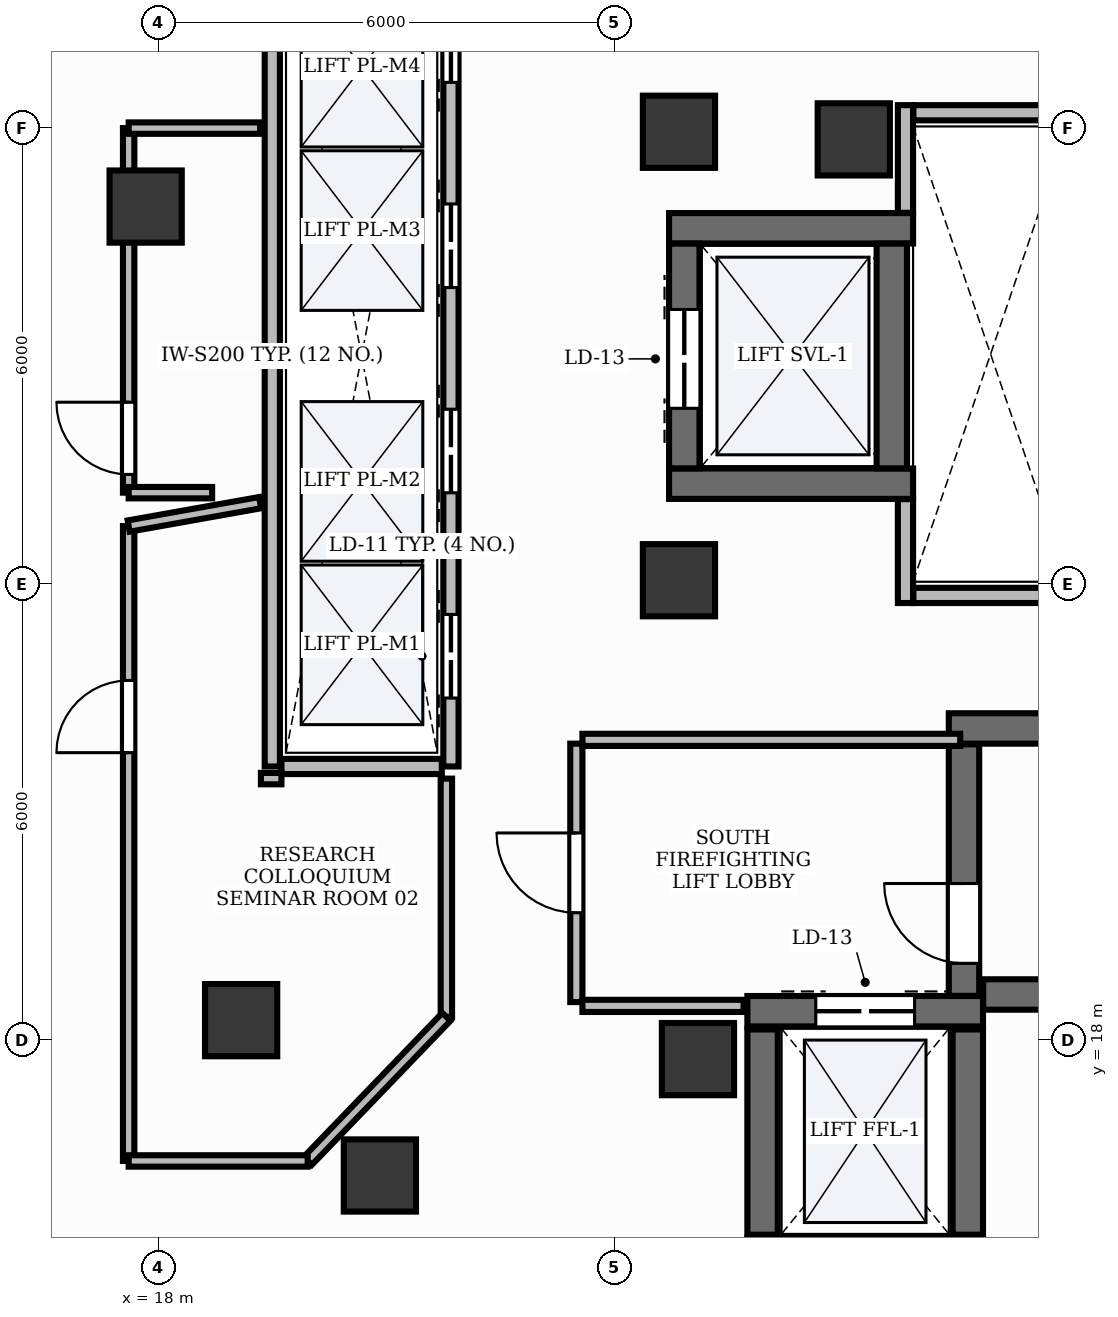
"""IFC4 building model, lengths in metres.
Left out: names, types, materials, properties, quantities, classifications, styles, units other than length and angle.
Written with IfcOpenShell. Run it as: python <this file> out.ifc"""

import sys

from ifc_helpers import new_model, si_unit, direction, frame, frame_2d, origin, origin_2d, place, context, subcontext, project, spatial, rectangle, extrude, element, fill, save


model = new_model("IFC4")
c1 = context("Model", 3, precision=1e-05, world=origin(), true_north=direction((0.0, 1.0)))
c2 = subcontext(c1, "Body", "Model", "MODEL_VIEW")
j1 = project(units=[si_unit("LENGTHUNIT", "METRE"), si_unit("PLANEANGLEUNIT", "RADIAN")], contexts=[c1])
p1 = place(None, origin())
s1 = spatial("IfcSite", under=j1, at=p1, CompositionType="ELEMENT")
p2 = place(p1, origin())
s2 = spatial("IfcBuilding", under=s1, at=p2, CompositionType="ELEMENT")
p3 = place(p2, frame((0.0, 0.0, 264.6)))
s3 = spatial("IfcBuildingStorey", under=s2, at=p3, CompositionType="ELEMENT", Elevation=264.6)
p4 = place(p3, frame((28.852, 18.6, 0.0), z_axis=(0.0, 0.0, 1.0), x_axis=(1.0, 0.0, 0.0)))
e1 = element("IfcWall", 1, at=p4, inside=s3, PredefinedType="SHEAR", context=c2, shape_type="SweptSolid", body=[
    extrude(rectangle(XDim=8.198, YDim=0.4, at=frame_2d((4.099, 0.0))), origin(), (0.0, 0.0, 1.0), 3.9),
])
p5 = place(p3, frame((28.4, 22.1, 0.0), z_axis=(0.0, 0.0, 1.0), x_axis=(1.0, 0.0, 0.0)))
e2 = element("IfcWall", 2, at=p5, inside=s3, PredefinedType="SHEAR", context=c2, shape_type="SweptSolid", body=[
    extrude(rectangle(XDim=8.65, YDim=0.4, at=frame_2d((4.325, 0.0))), origin(), (0.0, 0.0, 1.0), 3.9),
])
p6 = place(p3, frame((28.6, 18.582, 0.0), z_axis=(0.0, 0.0, 1.0), x_axis=(0.0, 1.0, 0.0)))
e3 = element("IfcWall", 3, at=p6, inside=s3, PredefinedType="SHEAR", context=c2, shape_type="SweptSolid", body=[
    extrude(rectangle(XDim=3.308, YDim=0.4, at=frame_2d((1.654, 0.0))), origin(), (0.0, 0.0, 1.0), 3.9),
])
p7 = place(p6, frame((0.428, 0.0, 0.0)))
e4 = element("IfcOpeningElement", 4, at=p7, cuts=e3, PredefinedType="OPENING", context=c2, shape_type="SweptSolid", body=[
    extrude(rectangle(XDim=1.05, YDim=2.15, at=frame_2d((0.525, 1.075))), frame((0.0, 0.215, 0.0), z_axis=(0.0, -1.0, 0.0), x_axis=(1.0, 0.0, 0.0)), (0.0, 0.0, 1.0), 0.43),
])
p8 = place(p3, frame((25.75, 18.38, 0.0), z_axis=(0.0, 0.0, 1.0), x_axis=(1.0, 0.0, 0.0)))
e5 = element("IfcWall", 5, at=p8, inside=s3, PredefinedType="SHEAR", context=c2, shape_type="SweptSolid", body=[
    extrude(rectangle(XDim=3.1, YDim=0.4, at=frame_2d((1.55, 0.0))), origin(), (0.0, 0.0, 1.0), 3.9),
])
p9 = place(p8, frame((0.9, 0.0, 0.0)))
e6 = element("IfcOpeningElement", 6, at=p9, cuts=e5, PredefinedType="OPENING", context=c2, shape_type="SweptSolid", body=[
    extrude(rectangle(XDim=1.3, YDim=2.2, at=frame_2d((0.65, 1.1))), frame((0.0, 0.215, 0.0), z_axis=(0.0, -1.0, 0.0), x_axis=(1.0, 0.0, 0.0)), (0.0, 0.0, 1.0), 0.43),
])
for number, where, z_axis, x_axis in (
    (7, (25.95, 15.44, 0.0), (0.0, 0.0, 1.0), (0.0, 1.0, 0.0)),
    (8, (28.65, 15.44, 0.0), (0.0, 0.0, 1.0), (0.0, 1.0, 0.0)),
):
    element("IfcWall", number, at=place(p3, frame(where, z_axis=z_axis, x_axis=x_axis)), inside=s3, PredefinedType="SHEAR", context=c2, shape_type="SweptSolid", body=[
        extrude(rectangle(XDim=2.7, YDim=0.4, at=frame_2d((1.35, 0.0))), origin(), (0.0, 0.0, 1.0), 3.9),
    ])
for number, where, z_axis, x_axis in (
    (9, (24.72, 28.68, 0.0), (0.0, 0.0, 1.0), (1.0, 0.0, 0.0)),
    (10, (24.72, 25.32, 0.0), (0.0, 0.0, 1.0), (1.0, 0.0, 0.0)),
):
    element("IfcWall", number, at=place(p3, frame(where, z_axis=z_axis, x_axis=x_axis)), inside=s3, PredefinedType="SHEAR", context=c2, shape_type="SweptSolid", body=[
        extrude(rectangle(XDim=3.21, YDim=0.4, at=frame_2d((1.605, 0.0))), origin(), (0.0, 0.0, 1.0), 3.9),
    ])
p10 = place(p3, frame((24.92, 25.522, 0.0), z_axis=(0.0, 0.0, 1.0), x_axis=(0.0, 1.0, 0.0)))
e11 = element("IfcWall", 11, at=p10, inside=s3, PredefinedType="SHEAR", context=c2, shape_type="SweptSolid", body=[
    extrude(rectangle(XDim=2.956, YDim=0.4, at=frame_2d((1.478, 0.0))), origin(), (0.0, 0.0, 1.0), 3.9),
])
p11 = place(p10, frame((0.79, 0.0, 0.0)))
e12 = element("IfcOpeningElement", 12, at=p11, cuts=e11, PredefinedType="OPENING", context=c2, shape_type="SweptSolid", body=[
    extrude(rectangle(XDim=1.3, YDim=2.2, at=frame_2d((0.65, 1.1))), frame((0.0, 0.215, 0.0), z_axis=(0.0, -1.0, 0.0), x_axis=(1.0, 0.0, 0.0)), (0.0, 0.0, 1.0), 0.43),
])
p12 = place(p3, frame((27.65, 25.522, 0.0), z_axis=(0.0, 0.0, 1.0), x_axis=(0.0, 1.0, 0.0)))
e13 = element("IfcWall", 13, at=p12, inside=s3, PredefinedType="SHEAR", context=c2, shape_type="SweptSolid", body=[
    extrude(rectangle(XDim=2.956, YDim=0.4, at=frame_2d((1.478, 0.0))), origin(), (0.0, 0.0, 1.0), 3.9),
])
for number, where, z_axis, x_axis in (
    (14, (24.85, 29.95, -0.0), (0.0, 0.0, 1.0), (1.0, 0.0, 0.0)),
    (15, (27.15, 29.85, -0.0), (0.0, 0.0, 1.0), (1.0, 0.0, 0.0)),
    (16, (24.85, 24.05, -0.0), (0.0, 0.0, 1.0), (1.0, 0.0, 0.0)),
    (17, (25.1, 17.75, -0.0), (0.0, 0.0, 1.0), (1.0, 0.0, 0.0)),
):
    element("IfcColumn", number, at=place(p3, frame(where, z_axis=z_axis, x_axis=x_axis)), inside=s3, PredefinedType="PILASTER", context=c2, shape_type="SweptSolid", body=[
        extrude(rectangle(XDim=0.95, YDim=0.95, at=origin_2d()), origin(), (0.0, 0.0, 1.0), 3.901),
    ])
for number, where, z_axis, x_axis in (
    (18, (17.834, 28.966, -0.0), (0.0, 0.0, 1.0), (1.0, 0.0, 0.0)),
    (19, (19.09, 18.262, -0.0), (0.0, 0.0, 1.0), (1.0, 0.0, 0.0)),
    (20, (20.915, 16.219, -0.0), (0.0, 0.0, 1.0), (1.0, 0.0, 0.0)),
):
    element("IfcColumn", number, at=place(p3, frame(where, z_axis=z_axis, x_axis=x_axis)), inside=s3, PredefinedType="COLUMN", context=c2, shape_type="SweptSolid", body=[
        extrude(rectangle(XDim=0.95, YDim=0.95, at=origin_2d()), origin(), (0.0, 0.0, 1.0), 3.901),
    ])
p13 = place(p3, frame((19.5, 21.6, 0.0), z_axis=(0.0, 0.0, 1.0), x_axis=(0.0, 1.0, 0.0)))
e21 = element("IfcWall", 21, at=p13, inside=s3, PredefinedType="PARTITIONING", context=c2, shape_type="SweptSolid", body=[
    extrude(rectangle(XDim=10.8, YDim=0.2, at=frame_2d((5.4, 0.0))), origin(), (0.0, 0.0, 1.0), 2.91),
])
p14 = place(p3, frame((21.85, 21.6, 0.0), z_axis=(0.0, 0.0, 1.0), x_axis=(0.0, 1.0, 0.0)))
e22 = element("IfcWall", 22, at=p14, inside=s3, PredefinedType="PARTITIONING", context=c2, shape_type="SweptSolid", body=[
    extrude(rectangle(XDim=10.8, YDim=0.2, at=frame_2d((5.4, 0.0))), origin(), (0.0, 0.0, 1.0), 2.91),
])
p15 = place(p14, frame((0.9, 0.0, 0.0)))
e23 = element("IfcOpeningElement", 23, at=p15, cuts=e22, PredefinedType="OPENING", context=c2, shape_type="SweptSolid", body=[
    extrude(rectangle(XDim=1.1, YDim=2.2, at=frame_2d((0.55, 1.1))), frame((0.0, 0.115, 0.0), z_axis=(0.0, -1.0, 0.0), x_axis=(1.0, 0.0, 0.0)), (0.0, 0.0, 1.0), 0.23),
])
p16 = place(p14, frame((3.6, 0.0, 0.0)))
e24 = element("IfcOpeningElement", 24, at=p16, cuts=e22, PredefinedType="OPENING", context=c2, shape_type="SweptSolid", body=[
    extrude(rectangle(XDim=1.1, YDim=2.2, at=frame_2d((0.55, 1.1))), frame((0.0, 0.115, 0.0), z_axis=(0.0, -1.0, 0.0), x_axis=(1.0, 0.0, 0.0)), (0.0, 0.0, 1.0), 0.23),
])
p17 = place(p14, frame((6.3, 0.0, 0.0)))
e25 = element("IfcOpeningElement", 25, at=p17, cuts=e22, PredefinedType="OPENING", context=c2, shape_type="SweptSolid", body=[
    extrude(rectangle(XDim=1.1, YDim=2.2, at=frame_2d((0.55, 1.1))), frame((0.0, 0.115, 0.0), z_axis=(0.0, -1.0, 0.0), x_axis=(1.0, 0.0, 0.0)), (0.0, 0.0, 1.0), 0.23),
])
p18 = place(p14, frame((9.0, 0.0, 0.0)))
e26 = element("IfcOpeningElement", 26, at=p18, cuts=e22, PredefinedType="OPENING", context=c2, shape_type="SweptSolid", body=[
    extrude(rectangle(XDim=1.1, YDim=2.2, at=frame_2d((0.55, 1.1))), frame((0.0, 0.115, 0.0), z_axis=(0.0, -1.0, 0.0), x_axis=(1.0, 0.0, 0.0)), (0.0, 0.0, 1.0), 0.23),
])
p19 = place(p3, frame((19.62, 21.6, 0.0), z_axis=(0.0, 0.0, 1.0), x_axis=(1.0, 0.0, 0.0)))
e27 = element("IfcWall", 27, at=p19, inside=s3, PredefinedType="PARTITIONING", context=c2, shape_type="SweptSolid", body=[
    extrude(rectangle(XDim=2.11, YDim=0.2, at=frame_2d((1.055, 0.0))), origin(), (0.0, 0.0, 1.0), 2.91),
])
p20 = place(p3, frame((27.83, 23.75, 0.0), z_axis=(0.0, 0.0, 1.0), x_axis=(0.0, 1.0, 0.0)))
e28 = element("IfcWall", 28, at=p20, inside=s3, PredefinedType="PARTITIONING", context=c2, shape_type="SweptSolid", body=[
    extrude(rectangle(XDim=1.366, YDim=0.2, at=frame_2d((0.683, 0.0))), origin(), (0.0, 0.0, 1.0), 2.91),
])
p21 = place(p3, frame((27.83, 28.884, 0.0), z_axis=(0.0, 0.0, 1.0), x_axis=(0.0, 1.0, 0.0)))
e29 = element("IfcWall", 29, at=p21, inside=s3, PredefinedType="PARTITIONING", context=c2, shape_type="SweptSolid", body=[
    extrude(rectangle(XDim=1.416, YDim=0.2, at=frame_2d((0.708, 0.0))), origin(), (0.0, 0.0, 1.0), 2.91),
])
for number, where, z_axis, x_axis in (
    (30, (27.934, 23.85, 0.0), (0.0, 0.0, 1.0), (1.0, 0.0, 0.0)),
    (31, (27.934, 30.2, 0.0), (0.0, 0.0, 1.0), (1.0, 0.0, 0.0)),
):
    element("IfcWall", number, at=place(p3, frame(where, z_axis=z_axis, x_axis=x_axis)), inside=s3, PredefinedType="PARTITIONING", context=c2, shape_type="SweptSolid", body=[
        extrude(rectangle(XDim=2.096, YDim=0.2, at=frame_2d((1.048, 0.0))), origin(), (0.0, 0.0, 1.0), 2.91),
    ])
p22 = place(p3, frame((23.5, 18.5, 0.0), z_axis=(0.0, 0.0, 1.0), x_axis=(0.0, 1.0, 0.0)))
e32 = element("IfcWall", 32, at=p22, inside=s3, PredefinedType="PARTITIONING", context=c2, shape_type="SweptSolid", body=[
    extrude(rectangle(XDim=3.4, YDim=0.16, at=frame_2d((1.7, 0.0))), origin(), (0.0, 0.0, 1.0), 2.91),
])
p23 = place(p22, frame((1.175, 0.0, 0.0)))
e33 = element("IfcOpeningElement", 33, at=p23, cuts=e32, PredefinedType="OPENING", context=c2, shape_type="SweptSolid", body=[
    extrude(rectangle(XDim=1.05, YDim=2.15, at=frame_2d((0.525, 1.075))), frame((0.0, 0.095, 0.0), z_axis=(0.0, -1.0, 0.0), x_axis=(1.0, 0.0, 0.0)), (0.0, 0.0, 1.0), 0.19),
])
p24 = place(p3, frame((23.58, 21.95, 0.0), z_axis=(0.0, 0.0, 1.0), x_axis=(1.0, 0.0, 0.0)))
e34 = element("IfcWall", 34, at=p24, inside=s3, PredefinedType="PARTITIONING", context=c2, shape_type="SweptSolid", body=[
    extrude(rectangle(XDim=4.97, YDim=0.16, at=frame_2d((2.485, 0.0))), origin(), (0.0, 0.0, 1.0), 2.91),
])
p25 = place(p3, frame((23.58, 18.45, 0.0), z_axis=(0.0, 0.0, 1.0), x_axis=(1.0, 0.0, 0.0)))
e35 = element("IfcWall", 35, at=p25, inside=s3, PredefinedType="PARTITIONING", context=c2, shape_type="SweptSolid", body=[
    extrude(rectangle(XDim=2.12, YDim=0.16, at=frame_2d((1.06, 0.0))), origin(), (0.0, 0.0, 1.0), 2.91),
])
p26 = place(p3, frame((17.61, 16.41, 0.0), z_axis=(0.0, 0.0, 1.0), x_axis=(0.0, 1.0, 0.0)))
e36 = element("IfcWall", 36, at=p26, inside=s3, PredefinedType="PARTITIONING", context=c2, shape_type="SweptSolid", body=[
    extrude(rectangle(XDim=8.353, YDim=0.15, at=frame_2d((4.176, 0.0))), origin(), (0.0, 0.0, 1.0), 2.91),
])
p27 = place(p26, frame((5.371, 0.0, 0.0)))
e37 = element("IfcOpeningElement", 37, at=p27, cuts=e36, PredefinedType="OPENING", context=c2, shape_type="SweptSolid", body=[
    extrude(rectangle(XDim=0.95, YDim=2.15, at=frame_2d((0.475, 1.075))), frame((0.0, 0.09, 0.0), z_axis=(0.0, -1.0, 0.0), x_axis=(1.0, 0.0, 0.0)), (0.0, 0.0, 1.0), 0.18),
])
p28 = place(p3, frame((17.61, 25.202, 0.0), z_axis=(0.0, 0.0, 1.0), x_axis=(0.0, 1.0, 0.0)))
e38 = element("IfcWall", 38, at=p28, inside=s3, PredefinedType="PARTITIONING", context=c2, shape_type="SweptSolid", body=[
    extrude(rectangle(XDim=4.796, YDim=0.15, at=frame_2d((2.398, 0.0))), origin(), (0.0, 0.0, 1.0), 2.91),
])
p29 = place(p28, frame((0.24, 0.0, 0.0)))
e39 = element("IfcOpeningElement", 39, at=p29, cuts=e38, PredefinedType="OPENING", context=c2, shape_type="SweptSolid", body=[
    extrude(rectangle(XDim=0.95, YDim=2.15, at=frame_2d((0.475, 1.075))), frame((0.0, 0.09, 0.0), z_axis=(0.0, -1.0, 0.0), x_axis=(1.0, 0.0, 0.0)), (0.0, 0.0, 1.0), 0.18),
])
p30 = place(p3, frame((19.35, 21.44, 0.0), z_axis=(0.0, 0.0, 1.0), x_axis=(1.0, 0.0, 0.0)))
e40 = element("IfcWall", 40, at=p30, inside=s3, PredefinedType="PARTITIONING", context=c2, shape_type="SweptSolid", body=[
    extrude(rectangle(XDim=0.27, YDim=0.15, at=frame_2d((0.135, 0.0))), origin(), (0.0, 0.0, 1.0), 2.91),
])
p31 = place(p3, frame((21.79, 21.44, 0.0), z_axis=(0.0, 0.0, 1.0), x_axis=(0.0, -1.0, 0.0)))
e41 = element("IfcWall", 41, at=p31, inside=s3, PredefinedType="PARTITIONING", context=c2, shape_type="SweptSolid", body=[
    extrude(rectangle(XDim=3.134, YDim=0.15, at=frame_2d((1.567, 0.0))), origin(), (0.0, 0.0, 1.0), 2.91),
])
p32 = place(p3, frame((21.79, 18.306, 0.0), z_axis=(0.0, 0.0, 1.0), x_axis=(-0.693381280986, -0.720570884215, 0.0)))
e42 = element("IfcWall", 42, at=p32, inside=s3, PredefinedType="PARTITIONING", context=c2, shape_type="SweptSolid", body=[
    extrude(rectangle(XDim=2.631, YDim=0.15, at=frame_2d((1.315, 0.0))), origin(), (0.0, 0.0, 1.0), 2.91),
])
p33 = place(p3, frame((19.966, 16.41, 0.0), z_axis=(0.0, 0.0, 1.0), x_axis=(-1.0, 0.0, 0.0)))
e43 = element("IfcWall", 43, at=p33, inside=s3, PredefinedType="PARTITIONING", context=c2, shape_type="SweptSolid", body=[
    extrude(rectangle(XDim=2.356, YDim=0.15, at=frame_2d((1.178, 0.0))), origin(), (0.0, 0.0, 1.0), 2.91),
])
p34 = place(p3, frame((17.61, 24.763, 0.0), z_axis=(0.0, 0.0, 1.0), x_axis=(0.984503916892, 0.175362589008, 0.0)))
e44 = element("IfcWall", 44, at=p34, inside=s3, PredefinedType="PARTITIONING", context=c2, shape_type="SweptSolid", body=[
    extrude(rectangle(XDim=1.757, YDim=0.15, at=frame_2d((0.878, 0.0))), origin(), (0.0, 0.0, 1.0), 2.91),
])
p35 = place(p3, frame((18.708, 25.202, 0.0), z_axis=(0.0, 0.0, 1.0), x_axis=(-1.0, 0.0, 0.0)))
e45 = element("IfcWall", 45, at=p35, inside=s3, PredefinedType="PARTITIONING", context=c2, shape_type="SweptSolid", body=[
    extrude(rectangle(XDim=1.098, YDim=0.15, at=frame_2d((0.549, 0.0))), origin(), (0.0, 0.0, 1.0), 2.91),
])
p36 = place(p3, frame((17.61, 29.998, 0.0), z_axis=(0.0, 0.0, 1.0), x_axis=(1.0, 0.0, 0.0)))
e46 = element("IfcWall", 46, at=p36, inside=s3, PredefinedType="PARTITIONING", context=c2, shape_type="SweptSolid", body=[
    extrude(rectangle(XDim=1.73, YDim=0.15, at=frame_2d((0.865, 0.0))), origin(), (0.0, 0.0, 1.0), 2.91),
])
p37 = place(p7, origin())
e47 = element("IfcDoor", 47, at=p37, inside=s3, OperationType="SINGLE_SWING_RIGHT", PredefinedType="DOOR", context=c2, shape_type="SweptSolid", body=[
    extrude(rectangle(XDim=1.05, YDim=2.15, at=frame_2d((0.525, 1.075))), frame((0.0, 0.025, 0.0), z_axis=(0.0, -1.0, 0.0), x_axis=(1.0, 0.0, 0.0)), (0.0, 0.0, 1.0), 0.05),
])
fill(e4, e47)
p38 = place(p15, origin())
e48 = element("IfcDoor", 48, at=p38, inside=s3, OperationType="DOUBLE_DOOR_SLIDING", PredefinedType="DOOR", context=c2, shape_type="SweptSolid", body=[
    extrude(rectangle(XDim=1.1, YDim=2.2, at=frame_2d((0.55, 1.1))), frame((0.0, 0.025, 0.0), z_axis=(0.0, -1.0, 0.0), x_axis=(1.0, 0.0, 0.0)), (0.0, 0.0, 1.0), 0.05),
])
fill(e23, e48)
p39 = place(p16, origin())
e49 = element("IfcDoor", 49, at=p39, inside=s3, OperationType="DOUBLE_DOOR_SLIDING", PredefinedType="DOOR", context=c2, shape_type="SweptSolid", body=[
    extrude(rectangle(XDim=1.1, YDim=2.2, at=frame_2d((0.55, 1.1))), frame((0.0, 0.025, 0.0), z_axis=(0.0, -1.0, 0.0), x_axis=(1.0, 0.0, 0.0)), (0.0, 0.0, 1.0), 0.05),
])
fill(e24, e49)
p40 = place(p17, origin())
e50 = element("IfcDoor", 50, at=p40, inside=s3, OperationType="DOUBLE_DOOR_SLIDING", PredefinedType="DOOR", context=c2, shape_type="SweptSolid", body=[
    extrude(rectangle(XDim=1.1, YDim=2.2, at=frame_2d((0.55, 1.1))), frame((0.0, 0.025, 0.0), z_axis=(0.0, -1.0, 0.0), x_axis=(1.0, 0.0, 0.0)), (0.0, 0.0, 1.0), 0.05),
])
fill(e25, e50)
p41 = place(p18, origin())
e51 = element("IfcDoor", 51, at=p41, inside=s3, OperationType="DOUBLE_DOOR_SLIDING", PredefinedType="DOOR", context=c2, shape_type="SweptSolid", body=[
    extrude(rectangle(XDim=1.1, YDim=2.2, at=frame_2d((0.55, 1.1))), frame((0.0, 0.025, 0.0), z_axis=(0.0, -1.0, 0.0), x_axis=(1.0, 0.0, 0.0)), (0.0, 0.0, 1.0), 0.05),
])
fill(e26, e51)
p42 = place(p9, origin())
e52 = element("IfcDoor", 52, at=p42, inside=s3, OperationType="DOUBLE_DOOR_SLIDING", PredefinedType="DOOR", context=c2, shape_type="SweptSolid", body=[
    extrude(rectangle(XDim=1.3, YDim=2.2, at=frame_2d((0.65, 1.1))), frame((0.0, 0.025, 0.0), z_axis=(0.0, -1.0, 0.0), x_axis=(1.0, 0.0, 0.0)), (0.0, 0.0, 1.0), 0.05),
])
fill(e6, e52)
p43 = place(p11, origin())
e53 = element("IfcDoor", 53, at=p43, inside=s3, OperationType="DOUBLE_DOOR_SLIDING", PredefinedType="DOOR", context=c2, shape_type="SweptSolid", body=[
    extrude(rectangle(XDim=1.3, YDim=2.2, at=frame_2d((0.65, 1.1))), frame((0.0, 0.025, 0.0), z_axis=(0.0, -1.0, 0.0), x_axis=(1.0, 0.0, 0.0)), (0.0, 0.0, 1.0), 0.05),
])
fill(e12, e53)
p44 = place(p23, origin())
e54 = element("IfcDoor", 54, at=p44, inside=s3, OperationType="SINGLE_SWING_RIGHT", PredefinedType="DOOR", context=c2, shape_type="SweptSolid", body=[
    extrude(rectangle(XDim=1.05, YDim=2.15, at=frame_2d((0.525, 1.075))), frame((0.0, 0.025, 0.0), z_axis=(0.0, -1.0, 0.0), x_axis=(1.0, 0.0, 0.0)), (0.0, 0.0, 1.0), 0.05),
])
fill(e33, e54)
p45 = place(p27, origin())
e55 = element("IfcDoor", 55, at=p45, inside=s3, OperationType="SINGLE_SWING_LEFT", PredefinedType="DOOR", context=c2, shape_type="SweptSolid", body=[
    extrude(rectangle(XDim=0.95, YDim=2.15, at=frame_2d((0.475, 1.075))), frame((0.0, 0.025, 0.0), z_axis=(0.0, -1.0, 0.0), x_axis=(1.0, 0.0, 0.0)), (0.0, 0.0, 1.0), 0.05),
])
fill(e37, e55)
p46 = place(p29, origin())
e56 = element("IfcDoor", 56, at=p46, inside=s3, OperationType="SINGLE_SWING_RIGHT", PredefinedType="DOOR", context=c2, shape_type="SweptSolid", body=[
    extrude(rectangle(XDim=0.95, YDim=2.15, at=frame_2d((0.475, 1.075))), frame((0.0, 0.025, 0.0), z_axis=(0.0, -1.0, 0.0), x_axis=(1.0, 0.0, 0.0)), (0.0, 0.0, 1.0), 0.05),
])
fill(e39, e56)
save(model, sys.argv[1])
